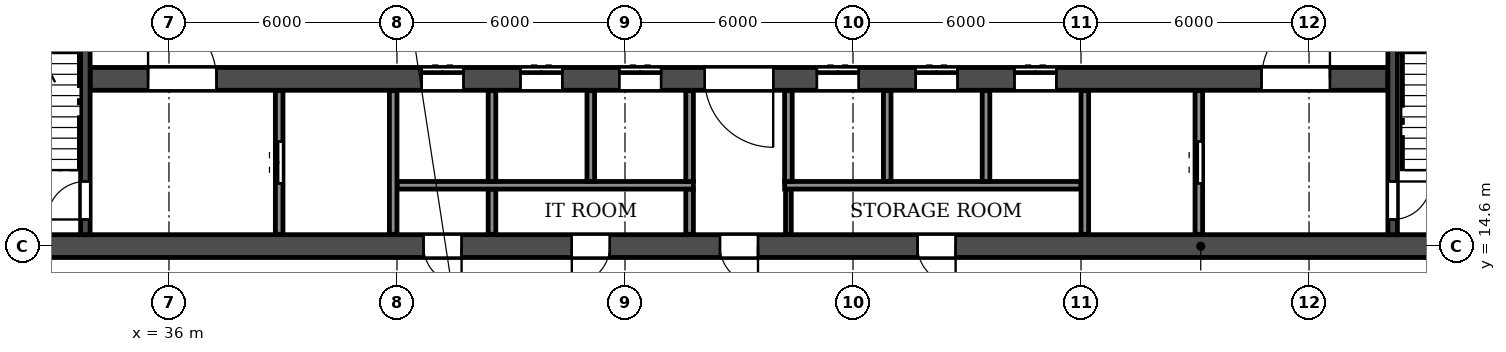
"""IFC4 building model, lengths in metres.
Left out: names, types, materials, properties, quantities, classifications, styles, units other than length and angle.
Written with IfcOpenShell. Run it as: python <this file> out.ifc"""

import sys

from ifc_helpers import new_model, si_unit, direction, frame, frame_2d, origin, place, context, subcontext, project, spatial, rectangle, extrude, element, fill, save


model = new_model("IFC4")
c1 = context("Model", 3, precision=1e-05, world=origin(), true_north=direction((0.0, 1.0)))
c2 = subcontext(c1, "Body", "Model", "MODEL_VIEW")
j1 = project(units=[si_unit("LENGTHUNIT", "METRE"), si_unit("PLANEANGLEUNIT", "RADIAN")], contexts=[c1])
p1 = place(None, origin())
s1 = spatial("IfcSite", under=j1, at=p1, CompositionType="ELEMENT")
p2 = place(p1, origin())
s2 = spatial("IfcBuilding", under=s1, at=p2, CompositionType="ELEMENT")
p3 = place(p2, frame((0.0, 0.0, 23.4)))
s3 = spatial("IfcBuildingStorey", under=s2, at=p3, CompositionType="ELEMENT", Elevation=23.4)
p4 = place(p3, frame((2.6, 14.6, 0.0), z_axis=(0.0, 0.0, 1.0), x_axis=(1.0, 0.0, 0.0)))
e1 = element("IfcWall", 1, at=p4, inside=s3, PredefinedType="SOLIDWALL", context=c2, shape_type="SweptSolid", body=[
    extrude(rectangle(XDim=96.8, YDim=0.6, at=frame_2d((48.4, 0.0))), origin(), (0.0, 0.0, 1.0), 3.05),
])
p5 = place(p4, frame((7.2, 0.0, 0.0)))
e2 = element("IfcOpeningElement", 2, at=p5, cuts=e1, PredefinedType="OPENING", context=c2, shape_type="SweptSolid", body=[
    extrude(rectangle(XDim=1.0, YDim=2.1, at=frame_2d((0.5, 1.05))), frame((0.0, 0.31, 0.0), z_axis=(0.0, -1.0, 0.0), x_axis=(1.0, 0.0, 0.0)), (0.0, 0.0, 1.0), 0.62),
])
p6 = place(p4, frame((16.3, 0.0, 0.0)))
e3 = element("IfcOpeningElement", 3, at=p6, cuts=e1, PredefinedType="OPENING", context=c2, shape_type="SweptSolid", body=[
    extrude(rectangle(XDim=1.0, YDim=2.1, at=frame_2d((0.5, 1.05))), frame((0.0, 0.31, 0.0), z_axis=(0.0, -1.0, 0.0), x_axis=(1.0, 0.0, 0.0)), (0.0, 0.0, 1.0), 0.62),
])
p7 = place(p4, frame((24.2, 0.0, 0.0)))
e4 = element("IfcOpeningElement", 4, at=p7, cuts=e1, PredefinedType="OPENING", context=c2, shape_type="SweptSolid", body=[
    extrude(rectangle(XDim=1.0, YDim=2.1, at=frame_2d((0.5, 1.05))), frame((0.0, 0.31, 0.0), z_axis=(0.0, -1.0, 0.0), x_axis=(1.0, 0.0, 0.0)), (0.0, 0.0, 1.0), 0.62),
])
p8 = place(p4, frame((28.8, 0.0, 0.0)))
e5 = element("IfcOpeningElement", 5, at=p8, cuts=e1, PredefinedType="OPENING", context=c2, shape_type="SweptSolid", body=[
    extrude(rectangle(XDim=1.0, YDim=2.1, at=frame_2d((0.5, 1.05))), frame((0.0, 0.31, 0.0), z_axis=(0.0, -1.0, 0.0), x_axis=(1.0, 0.0, 0.0)), (0.0, 0.0, 1.0), 0.62),
])
p9 = place(p4, frame((40.1, 0.0, 0.0)))
e6 = element("IfcOpeningElement", 6, at=p9, cuts=e1, PredefinedType="OPENING", context=c2, shape_type="SweptSolid", body=[
    extrude(rectangle(XDim=1.0, YDim=2.1, at=frame_2d((0.5, 1.05))), frame((0.0, 0.31, 0.0), z_axis=(0.0, -1.0, 0.0), x_axis=(1.0, 0.0, 0.0)), (0.0, 0.0, 1.0), 0.62),
])
p10 = place(p4, frame((44.0, 0.0, 0.0)))
e7 = element("IfcOpeningElement", 7, at=p10, cuts=e1, PredefinedType="OPENING", context=c2, shape_type="SweptSolid", body=[
    extrude(rectangle(XDim=1.0, YDim=2.1, at=frame_2d((0.5, 1.05))), frame((0.0, 0.31, 0.0), z_axis=(0.0, -1.0, 0.0), x_axis=(1.0, 0.0, 0.0)), (0.0, 0.0, 1.0), 0.62),
])
p11 = place(p4, frame((47.9, 0.0, 0.0)))
e8 = element("IfcOpeningElement", 8, at=p11, cuts=e1, PredefinedType="OPENING", context=c2, shape_type="SweptSolid", body=[
    extrude(rectangle(XDim=1.0, YDim=2.1, at=frame_2d((0.5, 1.05))), frame((0.0, 0.31, 0.0), z_axis=(0.0, -1.0, 0.0), x_axis=(1.0, 0.0, 0.0)), (0.0, 0.0, 1.0), 0.62),
])
p12 = place(p4, frame((53.1, 0.0, 0.0)))
e9 = element("IfcOpeningElement", 9, at=p12, cuts=e1, PredefinedType="OPENING", context=c2, shape_type="SweptSolid", body=[
    extrude(rectangle(XDim=1.0, YDim=2.1, at=frame_2d((0.5, 1.05))), frame((0.0, 0.31, 0.0), z_axis=(0.0, -1.0, 0.0), x_axis=(1.0, 0.0, 0.0)), (0.0, 0.0, 1.0), 0.62),
])
p13 = place(p4, frame((67.0, 0.0, 0.0)))
e10 = element("IfcOpeningElement", 10, at=p13, cuts=e1, PredefinedType="OPENING", context=c2, shape_type="SweptSolid", body=[
    extrude(rectangle(XDim=1.0, YDim=2.1, at=frame_2d((0.5, 1.05))), frame((0.0, 0.31, 0.0), z_axis=(0.0, -1.0, 0.0), x_axis=(1.0, 0.0, 0.0)), (0.0, 0.0, 1.0), 0.62),
])
p14 = place(p4, frame((71.6, 0.0, 0.0)))
e11 = element("IfcOpeningElement", 11, at=p14, cuts=e1, PredefinedType="OPENING", context=c2, shape_type="SweptSolid", body=[
    extrude(rectangle(XDim=1.0, YDim=2.1, at=frame_2d((0.5, 1.05))), frame((0.0, 0.31, 0.0), z_axis=(0.0, -1.0, 0.0), x_axis=(1.0, 0.0, 0.0)), (0.0, 0.0, 1.0), 0.62),
])
p15 = place(p4, frame((79.5, 0.0, 0.0)))
e12 = element("IfcOpeningElement", 12, at=p15, cuts=e1, PredefinedType="OPENING", context=c2, shape_type="SweptSolid", body=[
    extrude(rectangle(XDim=1.0, YDim=2.1, at=frame_2d((0.5, 1.05))), frame((0.0, 0.31, 0.0), z_axis=(0.0, -1.0, 0.0), x_axis=(1.0, 0.0, 0.0)), (0.0, 0.0, 1.0), 0.62),
])
p16 = place(p4, frame((83.15, 0.0, 0.0)))
e13 = element("IfcOpeningElement", 13, at=p16, cuts=e1, PredefinedType="OPENING", context=c2, shape_type="SweptSolid", body=[
    extrude(rectangle(XDim=1.0, YDim=2.1, at=frame_2d((0.5, 1.05))), frame((0.0, 0.31, 0.0), z_axis=(0.0, -1.0, 0.0), x_axis=(1.0, 0.0, 0.0)), (0.0, 0.0, 1.0), 0.62),
])
p17 = place(p4, frame((90.85, 0.0, 0.0)))
e14 = element("IfcOpeningElement", 14, at=p17, cuts=e1, PredefinedType="OPENING", context=c2, shape_type="SweptSolid", body=[
    extrude(rectangle(XDim=1.0, YDim=2.1, at=frame_2d((0.5, 1.05))), frame((0.0, 0.31, 0.0), z_axis=(0.0, -1.0, 0.0), x_axis=(1.0, 0.0, 0.0)), (0.0, 0.0, 1.0), 0.62),
])
p18 = place(p3, frame((33.925, 19.0, 0.0), z_axis=(0.0, 0.0, 1.0), x_axis=(1.0, 0.0, 0.0)))
e15 = element("IfcWall", 15, at=p18, inside=s3, PredefinedType="SOLIDWALL", context=c2, shape_type="SweptSolid", body=[
    extrude(rectangle(XDim=34.15, YDim=0.6, at=frame_2d((17.075, 0.0))), origin(), (0.0, 0.0, 1.0), 3.05),
])
p19 = place(p18, frame((16.175, 0.0, 0.0)))
e16 = element("IfcOpeningElement", 16, at=p19, cuts=e15, PredefinedType="OPENING", context=c2, shape_type="SweptSolid", body=[
    extrude(rectangle(XDim=1.8, YDim=2.1, at=frame_2d((0.9, 1.05))), frame((0.0, 0.31, 0.0), z_axis=(0.0, -1.0, 0.0), x_axis=(1.0, 0.0, 0.0)), (0.0, 0.0, 1.0), 0.62),
])
p20 = place(p18, frame((1.525, 0.0, 0.0)))
e17 = element("IfcOpeningElement", 17, at=p20, cuts=e15, PredefinedType="OPENING", context=c2, shape_type="SweptSolid", body=[
    extrude(rectangle(XDim=1.8, YDim=2.1, at=frame_2d((0.9, 1.05))), frame((0.0, 0.31, 0.0), z_axis=(0.0, -1.0, 0.0), x_axis=(1.0, 0.0, 0.0)), (0.0, 0.0, 1.0), 0.62),
])
p21 = place(p18, frame((8.725, 0.0, 0.0)))
e18 = element("IfcOpeningElement", 18, at=p21, cuts=e15, PredefinedType="OPENING", context=c2, shape_type="SweptSolid", body=[
    extrude(rectangle(XDim=1.1, YDim=2.1, at=frame_2d((0.55, 1.05))), frame((0.0, 0.31, 0.0), z_axis=(0.0, -1.0, 0.0), x_axis=(1.0, 0.0, 0.0)), (0.0, 0.0, 1.0), 0.62),
])
p22 = place(p18, frame((11.325, 0.0, 0.0)))
e19 = element("IfcOpeningElement", 19, at=p22, cuts=e15, PredefinedType="OPENING", context=c2, shape_type="SweptSolid", body=[
    extrude(rectangle(XDim=1.1, YDim=2.1, at=frame_2d((0.55, 1.05))), frame((0.0, 0.31, 0.0), z_axis=(0.0, -1.0, 0.0), x_axis=(1.0, 0.0, 0.0)), (0.0, 0.0, 1.0), 0.62),
])
p23 = place(p18, frame((13.925, 0.0, 0.0)))
e20 = element("IfcOpeningElement", 20, at=p23, cuts=e15, PredefinedType="OPENING", context=c2, shape_type="SweptSolid", body=[
    extrude(rectangle(XDim=1.1, YDim=2.1, at=frame_2d((0.55, 1.05))), frame((0.0, 0.31, 0.0), z_axis=(0.0, -1.0, 0.0), x_axis=(1.0, 0.0, 0.0)), (0.0, 0.0, 1.0), 0.62),
])
p24 = place(p18, frame((19.125, 0.0, 0.0)))
e21 = element("IfcOpeningElement", 21, at=p24, cuts=e15, PredefinedType="OPENING", context=c2, shape_type="SweptSolid", body=[
    extrude(rectangle(XDim=1.1, YDim=2.1, at=frame_2d((0.55, 1.05))), frame((0.0, 0.31, 0.0), z_axis=(0.0, -1.0, 0.0), x_axis=(1.0, 0.0, 0.0)), (0.0, 0.0, 1.0), 0.62),
])
p25 = place(p18, frame((21.725, 0.0, 0.0)))
e22 = element("IfcOpeningElement", 22, at=p25, cuts=e15, PredefinedType="OPENING", context=c2, shape_type="SweptSolid", body=[
    extrude(rectangle(XDim=1.1, YDim=2.1, at=frame_2d((0.55, 1.05))), frame((0.0, 0.31, 0.0), z_axis=(0.0, -1.0, 0.0), x_axis=(1.0, 0.0, 0.0)), (0.0, 0.0, 1.0), 0.62),
])
p26 = place(p18, frame((24.325, 0.0, 0.0)))
e23 = element("IfcOpeningElement", 23, at=p26, cuts=e15, PredefinedType="OPENING", context=c2, shape_type="SweptSolid", body=[
    extrude(rectangle(XDim=1.1, YDim=2.1, at=frame_2d((0.55, 1.05))), frame((0.0, 0.31, 0.0), z_axis=(0.0, -1.0, 0.0), x_axis=(1.0, 0.0, 0.0)), (0.0, 0.0, 1.0), 0.62),
])
p27 = place(p18, frame((30.825, 0.0, 0.0)))
e24 = element("IfcOpeningElement", 24, at=p27, cuts=e15, PredefinedType="OPENING", context=c2, shape_type="SweptSolid", body=[
    extrude(rectangle(XDim=1.8, YDim=2.1, at=frame_2d((0.9, 1.05))), frame((0.0, 0.31, 0.0), z_axis=(0.0, -1.0, 0.0), x_axis=(1.0, 0.0, 0.0)), (0.0, 0.0, 1.0), 0.62),
])
p28 = place(p3, frame((33.8, 14.9, 0.0), z_axis=(0.0, 0.0, 1.0), x_axis=(0.0, 1.0, 0.0)))
e25 = element("IfcWall", 25, at=p28, inside=s3, PredefinedType="SOLIDWALL", context=c2, shape_type="SweptSolid", body=[
    extrude(rectangle(XDim=7.575, YDim=0.25, at=frame_2d((3.788, 0.0))), origin(), (0.0, 0.0, 1.0), 3.05),
])
p29 = place(p28, frame((0.4, 0.0, 0.0)))
e26 = element("IfcOpeningElement", 26, at=p29, cuts=e25, PredefinedType="OPENING", context=c2, shape_type="SweptSolid", body=[
    extrude(rectangle(XDim=1.0, YDim=2.1, at=frame_2d((0.5, 1.05))), frame((0.0, 0.135, 0.0), z_axis=(0.0, -1.0, 0.0), x_axis=(1.0, 0.0, 0.0)), (0.0, 0.0, 1.0), 0.27),
])
p30 = place(p3, frame((68.2, 14.9, 0.0), z_axis=(0.0, 0.0, 1.0), x_axis=(0.0, 1.0, 0.0)))
e27 = element("IfcWall", 27, at=p30, inside=s3, PredefinedType="SOLIDWALL", context=c2, shape_type="SweptSolid", body=[
    extrude(rectangle(XDim=7.575, YDim=0.25, at=frame_2d((3.788, 0.0))), origin(), (0.0, 0.0, 1.0), 3.05),
])
p31 = place(p30, frame((0.4, 0.0, 0.0)))
e28 = element("IfcOpeningElement", 28, at=p31, cuts=e27, PredefinedType="OPENING", context=c2, shape_type="SweptSolid", body=[
    extrude(rectangle(XDim=1.0, YDim=2.1, at=frame_2d((0.5, 1.05))), frame((0.0, 0.135, 0.0), z_axis=(0.0, -1.0, 0.0), x_axis=(1.0, 0.0, 0.0)), (0.0, 0.0, 1.0), 0.27),
])
p32 = place(p3, frame((52.3, 14.91, 0.0), z_axis=(0.0, 0.0, 1.0), x_axis=(0.0, 1.0, 0.0)))
e29 = element("IfcWall", 29, at=p32, inside=s3, PredefinedType="PARTITIONING", context=c2, shape_type="SweptSolid", body=[
    extrude(rectangle(XDim=1.19, YDim=0.15, at=frame_2d((0.595, 0.0))), origin(), (0.0, 0.0, 1.0), 3.05),
])
for number, where, z_axis, x_axis in (
    (30, (44.5, 14.91, 0.0), (0.0, 0.0, 1.0), (0.0, 1.0, 0.0)),
    (31, (49.7, 14.91, 0.0), (0.0, 0.0, 1.0), (0.0, 1.0, 0.0)),
):
    element("IfcWall", number, at=place(p3, frame(where, z_axis=z_axis, x_axis=x_axis)), inside=s3, PredefinedType="PARTITIONING", context=c2, shape_type="SweptSolid", body=[
        extrude(rectangle(XDim=1.19, YDim=0.2, at=frame_2d((0.595, 0.0))), origin(), (0.0, 0.0, 1.0), 3.05),
    ])
for number, where, z_axis, x_axis in (
    (32, (42.0, 16.2, 0.0), (0.0, 0.0, 1.0), (1.0, 0.0, 0.0)),
    (33, (52.2, 16.2, 0.0), (0.0, 0.0, 1.0), (1.0, 0.0, 0.0)),
):
    element("IfcWall", number, at=place(p3, frame(where, z_axis=z_axis, x_axis=x_axis)), inside=s3, PredefinedType="PARTITIONING", context=c2, shape_type="SweptSolid", body=[
        extrude(rectangle(XDim=7.8, YDim=0.2, at=frame_2d((3.9, 0.0))), origin(), (0.0, 0.0, 1.0), 3.05),
    ])
p33 = place(p3, frame((38.9, 14.91, 0.0), z_axis=(0.0, 0.0, 1.0), x_axis=(0.0, 1.0, 0.0)))
e34 = element("IfcWall", 34, at=p33, inside=s3, PredefinedType="PARTITIONING", context=c2, shape_type="SweptSolid", body=[
    extrude(rectangle(XDim=3.78, YDim=0.2, at=frame_2d((1.89, 0.0))), origin(), (0.0, 0.0, 1.0), 3.05),
])
p34 = place(p33, frame((1.34, 0.0, 0.0)))
e35 = element("IfcOpeningElement", 35, at=p34, cuts=e34, PredefinedType="OPENING", context=c2, shape_type="SweptSolid", body=[
    extrude(rectangle(XDim=1.1, YDim=2.1, at=frame_2d((0.55, 1.05))), frame((0.0, 0.11, 0.0), z_axis=(0.0, -1.0, 0.0), x_axis=(1.0, 0.0, 0.0)), (0.0, 0.0, 1.0), 0.22),
])
p35 = place(p3, frame((41.9, 14.91, 0.0), z_axis=(0.0, 0.0, 1.0), x_axis=(0.0, 1.0, 0.0)))
e36 = element("IfcWall", 36, at=p35, inside=s3, PredefinedType="PARTITIONING", context=c2, shape_type="SweptSolid", body=[
    extrude(rectangle(XDim=3.78, YDim=0.2, at=frame_2d((1.89, 0.0))), origin(), (0.0, 0.0, 1.0), 3.05),
])
for number, where, z_axis, x_axis in (
    (37, (44.5, 16.3, 0.0), (0.0, 0.0, 1.0), (0.0, 1.0, 0.0)),
    (38, (47.1, 16.3, 0.0), (0.0, 0.0, 1.0), (0.0, 1.0, 0.0)),
    (39, (49.7, 16.3, 0.0), (0.0, 0.0, 1.0), (0.0, 1.0, 0.0)),
    (40, (52.3, 16.3, 0.0), (0.0, 0.0, 1.0), (0.0, 1.0, 0.0)),
    (41, (54.9, 16.3, 0.0), (0.0, 0.0, 1.0), (0.0, 1.0, 0.0)),
    (42, (57.5, 16.3, 0.0), (0.0, 0.0, 1.0), (0.0, 1.0, 0.0)),
):
    element("IfcWall", number, at=place(p3, frame(where, z_axis=z_axis, x_axis=x_axis)), inside=s3, PredefinedType="PARTITIONING", context=c2, shape_type="SweptSolid", body=[
        extrude(rectangle(XDim=2.39, YDim=0.2, at=frame_2d((1.195, 0.0))), origin(), (0.0, 0.0, 1.0), 3.05),
    ])
p36 = place(p3, frame((60.1, 14.91, 0.0), z_axis=(0.0, 0.0, 1.0), x_axis=(0.0, 1.0, 0.0)))
e43 = element("IfcWall", 43, at=p36, inside=s3, PredefinedType="PARTITIONING", context=c2, shape_type="SweptSolid", body=[
    extrude(rectangle(XDim=3.78, YDim=0.2, at=frame_2d((1.89, 0.0))), origin(), (0.0, 0.0, 1.0), 3.05),
])
p37 = place(p3, frame((63.1, 14.91, 0.0), z_axis=(0.0, 0.0, 1.0), x_axis=(0.0, 1.0, 0.0)))
e44 = element("IfcWall", 44, at=p37, inside=s3, PredefinedType="PARTITIONING", context=c2, shape_type="SweptSolid", body=[
    extrude(rectangle(XDim=3.78, YDim=0.2, at=frame_2d((1.89, 0.0))), origin(), (0.0, 0.0, 1.0), 3.05),
])
p38 = place(p37, frame((1.34, 0.0, 0.0)))
e45 = element("IfcOpeningElement", 45, at=p38, cuts=e44, PredefinedType="OPENING", context=c2, shape_type="SweptSolid", body=[
    extrude(rectangle(XDim=1.1, YDim=2.1, at=frame_2d((0.55, 1.05))), frame((0.0, 0.11, 0.0), z_axis=(0.0, -1.0, 0.0), x_axis=(1.0, 0.0, 0.0)), (0.0, 0.0, 1.0), 0.22),
])
p39 = place(p9, frame((1.0, 0.0, 0.0), z_axis=(0.0, 0.0, 1.0), x_axis=(-1.0, 0.0, 0.0)))
e46 = element("IfcDoor", 46, at=p39, inside=s3, OperationType="SINGLE_SWING_LEFT", PredefinedType="DOOR", context=c2, shape_type="SweptSolid", body=[
    extrude(rectangle(XDim=1.0, YDim=2.1, at=frame_2d((0.5, 1.05))), frame((0.0, 0.025, 0.0), z_axis=(0.0, -1.0, 0.0), x_axis=(1.0, 0.0, 0.0)), (0.0, 0.0, 1.0), 0.05),
])
fill(e6, e46)
p40 = place(p10, frame((1.0, 0.0, 0.0), z_axis=(0.0, 0.0, 1.0), x_axis=(-1.0, 0.0, 0.0)))
e47 = element("IfcDoor", 47, at=p40, inside=s3, OperationType="SINGLE_SWING_RIGHT", PredefinedType="DOOR", context=c2, shape_type="SweptSolid", body=[
    extrude(rectangle(XDim=1.0, YDim=2.1, at=frame_2d((0.5, 1.05))), frame((0.0, 0.025, 0.0), z_axis=(0.0, -1.0, 0.0), x_axis=(1.0, 0.0, 0.0)), (0.0, 0.0, 1.0), 0.05),
])
fill(e7, e47)
p41 = place(p11, frame((1.0, 0.0, 0.0), z_axis=(0.0, 0.0, 1.0), x_axis=(-1.0, 0.0, 0.0)))
e48 = element("IfcDoor", 48, at=p41, inside=s3, OperationType="SINGLE_SWING_LEFT", PredefinedType="DOOR", context=c2, shape_type="SweptSolid", body=[
    extrude(rectangle(XDim=1.0, YDim=2.1, at=frame_2d((0.5, 1.05))), frame((0.0, 0.025, 0.0), z_axis=(0.0, -1.0, 0.0), x_axis=(1.0, 0.0, 0.0)), (0.0, 0.0, 1.0), 0.05),
])
fill(e8, e48)
p42 = place(p12, frame((1.0, 0.0, 0.0), z_axis=(0.0, 0.0, 1.0), x_axis=(-1.0, 0.0, 0.0)))
e49 = element("IfcDoor", 49, at=p42, inside=s3, OperationType="SINGLE_SWING_LEFT", PredefinedType="DOOR", context=c2, shape_type="SweptSolid", body=[
    extrude(rectangle(XDim=1.0, YDim=2.1, at=frame_2d((0.5, 1.05))), frame((0.0, 0.025, 0.0), z_axis=(0.0, -1.0, 0.0), x_axis=(1.0, 0.0, 0.0)), (0.0, 0.0, 1.0), 0.05),
])
fill(e9, e49)
p43 = place(p38, origin())
e50 = element("IfcDoor", 50, at=p43, inside=s3, OperationType="DOUBLE_DOOR_SLIDING", PredefinedType="DOOR", context=c2, shape_type="SweptSolid", body=[
    extrude(rectangle(XDim=1.1, YDim=2.1, at=frame_2d((0.55, 1.05))), frame((0.0, 0.025, 0.0), z_axis=(0.0, -1.0, 0.0), x_axis=(1.0, 0.0, 0.0)), (0.0, 0.0, 1.0), 0.05),
])
fill(e45, e50)
p44 = place(p31, frame((1.0, 0.0, 0.0), z_axis=(0.0, 0.0, 1.0), x_axis=(-1.0, 0.0, 0.0)))
e51 = element("IfcDoor", 51, at=p44, inside=s3, OperationType="SINGLE_SWING_LEFT", PredefinedType="DOOR", context=c2, shape_type="SweptSolid", body=[
    extrude(rectangle(XDim=1.0, YDim=2.1, at=frame_2d((0.5, 1.05))), frame((0.0, 0.025, 0.0), z_axis=(0.0, -1.0, 0.0), x_axis=(1.0, 0.0, 0.0)), (0.0, 0.0, 1.0), 0.05),
])
fill(e28, e51)
p45 = place(p29, origin())
e52 = element("IfcDoor", 52, at=p45, inside=s3, OperationType="SINGLE_SWING_LEFT", PredefinedType="DOOR", context=c2, shape_type="SweptSolid", body=[
    extrude(rectangle(XDim=1.0, YDim=2.1, at=frame_2d((0.5, 1.05))), frame((0.0, 0.025, 0.0), z_axis=(0.0, -1.0, 0.0), x_axis=(1.0, 0.0, 0.0)), (0.0, 0.0, 1.0), 0.05),
])
fill(e26, e52)
p46 = place(p34, origin())
e53 = element("IfcDoor", 53, at=p46, inside=s3, OperationType="DOUBLE_DOOR_SLIDING", PredefinedType="DOOR", context=c2, shape_type="SweptSolid", body=[
    extrude(rectangle(XDim=1.1, YDim=2.1, at=frame_2d((0.55, 1.05))), frame((0.0, 0.025, 0.0), z_axis=(0.0, -1.0, 0.0), x_axis=(1.0, 0.0, 0.0)), (0.0, 0.0, 1.0), 0.05),
])
fill(e35, e53)
p47 = place(p19, frame((1.8, 0.0, 0.0), z_axis=(0.0, 0.0, 1.0), x_axis=(-1.0, 0.0, 0.0)))
e54 = element("IfcDoor", 54, at=p47, inside=s3, OperationType="DOUBLE_DOOR_SINGLE_SWING", PredefinedType="DOOR", context=c2, shape_type="SweptSolid", body=[
    extrude(rectangle(XDim=1.8, YDim=2.1, at=frame_2d((0.9, 1.05))), frame((0.0, 0.025, 0.0), z_axis=(0.0, -1.0, 0.0), x_axis=(1.0, 0.0, 0.0)), (0.0, 0.0, 1.0), 0.05),
])
fill(e16, e54)
p48 = place(p20, origin())
e55 = element("IfcDoor", 55, at=p48, inside=s3, OperationType="DOUBLE_DOOR_SINGLE_SWING", PredefinedType="DOOR", context=c2, shape_type="SweptSolid", body=[
    extrude(rectangle(XDim=1.8, YDim=2.1, at=frame_2d((0.9, 1.05))), frame((0.0, 0.025, 0.0), z_axis=(0.0, -1.0, 0.0), x_axis=(1.0, 0.0, 0.0)), (0.0, 0.0, 1.0), 0.05),
])
fill(e17, e55)
p49 = place(p21, origin())
e56 = element("IfcDoor", 56, at=p49, inside=s3, OperationType="DOUBLE_DOOR_SLIDING", PredefinedType="DOOR", context=c2, shape_type="SweptSolid", body=[
    extrude(rectangle(XDim=1.1, YDim=2.1, at=frame_2d((0.55, 1.05))), frame((0.0, 0.025, 0.0), z_axis=(0.0, -1.0, 0.0), x_axis=(1.0, 0.0, 0.0)), (0.0, 0.0, 1.0), 0.05),
])
fill(e18, e56)
p50 = place(p22, origin())
e57 = element("IfcDoor", 57, at=p50, inside=s3, OperationType="DOUBLE_DOOR_SLIDING", PredefinedType="DOOR", context=c2, shape_type="SweptSolid", body=[
    extrude(rectangle(XDim=1.1, YDim=2.1, at=frame_2d((0.55, 1.05))), frame((0.0, 0.025, 0.0), z_axis=(0.0, -1.0, 0.0), x_axis=(1.0, 0.0, 0.0)), (0.0, 0.0, 1.0), 0.05),
])
fill(e19, e57)
p51 = place(p23, origin())
e58 = element("IfcDoor", 58, at=p51, inside=s3, OperationType="DOUBLE_DOOR_SLIDING", PredefinedType="DOOR", context=c2, shape_type="SweptSolid", body=[
    extrude(rectangle(XDim=1.1, YDim=2.1, at=frame_2d((0.55, 1.05))), frame((0.0, 0.025, 0.0), z_axis=(0.0, -1.0, 0.0), x_axis=(1.0, 0.0, 0.0)), (0.0, 0.0, 1.0), 0.05),
])
fill(e20, e58)
p52 = place(p24, origin())
e59 = element("IfcDoor", 59, at=p52, inside=s3, OperationType="DOUBLE_DOOR_SLIDING", PredefinedType="DOOR", context=c2, shape_type="SweptSolid", body=[
    extrude(rectangle(XDim=1.1, YDim=2.1, at=frame_2d((0.55, 1.05))), frame((0.0, 0.025, 0.0), z_axis=(0.0, -1.0, 0.0), x_axis=(1.0, 0.0, 0.0)), (0.0, 0.0, 1.0), 0.05),
])
fill(e21, e59)
p53 = place(p25, origin())
e60 = element("IfcDoor", 60, at=p53, inside=s3, OperationType="DOUBLE_DOOR_SLIDING", PredefinedType="DOOR", context=c2, shape_type="SweptSolid", body=[
    extrude(rectangle(XDim=1.1, YDim=2.1, at=frame_2d((0.55, 1.05))), frame((0.0, 0.025, 0.0), z_axis=(0.0, -1.0, 0.0), x_axis=(1.0, 0.0, 0.0)), (0.0, 0.0, 1.0), 0.05),
])
fill(e22, e60)
p54 = place(p26, origin())
e61 = element("IfcDoor", 61, at=p54, inside=s3, OperationType="DOUBLE_DOOR_SLIDING", PredefinedType="DOOR", context=c2, shape_type="SweptSolid", body=[
    extrude(rectangle(XDim=1.1, YDim=2.1, at=frame_2d((0.55, 1.05))), frame((0.0, 0.025, 0.0), z_axis=(0.0, -1.0, 0.0), x_axis=(1.0, 0.0, 0.0)), (0.0, 0.0, 1.0), 0.05),
])
fill(e23, e61)
p55 = place(p27, origin())
e62 = element("IfcDoor", 62, at=p55, inside=s3, OperationType="DOUBLE_DOOR_SINGLE_SWING", PredefinedType="DOOR", context=c2, shape_type="SweptSolid", body=[
    extrude(rectangle(XDim=1.8, YDim=2.1, at=frame_2d((0.9, 1.05))), frame((0.0, 0.025, 0.0), z_axis=(0.0, -1.0, 0.0), x_axis=(1.0, 0.0, 0.0)), (0.0, 0.0, 1.0), 0.05),
])
fill(e24, e62)
save(model, sys.argv[1])
